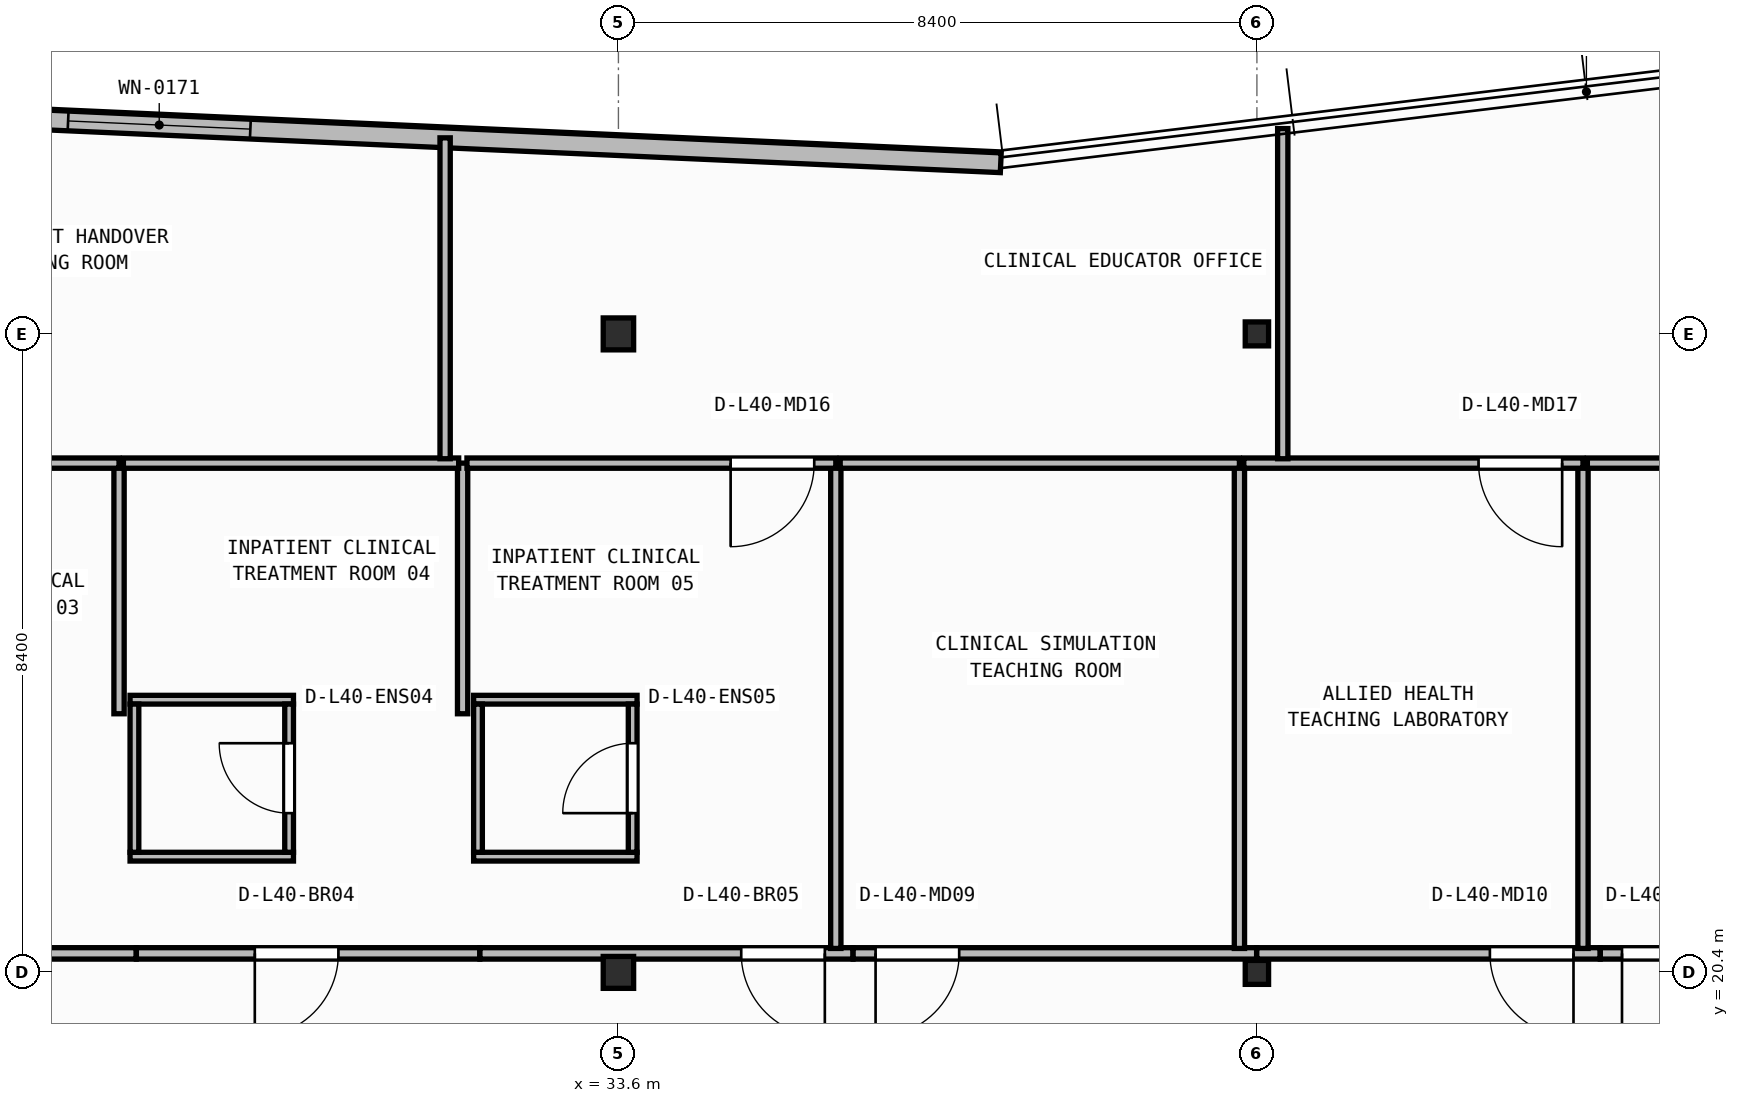
"""IFC4 building model, lengths in metres.
Left out: names, types, materials, properties, quantities, classifications, styles, units other than length and angle.
Written with IfcOpenShell. Run it as: python <this file> out.ifc"""

import sys

from ifc_helpers import new_model, si_unit, direction, frame, frame_2d, origin, origin_2d, place, context, subcontext, project, spatial, rectangle, i_section, extrude, element, fill, save


model = new_model("IFC4")
c1 = context("Model", 3, precision=1e-05, world=origin(), true_north=direction((0.0, 1.0)))
c2 = subcontext(c1, "Body", "Model", "MODEL_VIEW")
j1 = project(units=[si_unit("LENGTHUNIT", "METRE"), si_unit("PLANEANGLEUNIT", "RADIAN")], contexts=[c1])
p1 = place(None, origin())
s1 = spatial("IfcSite", under=j1, at=p1, CompositionType="ELEMENT")
p2 = place(p1, origin())
s2 = spatial("IfcBuilding", under=s1, at=p2, CompositionType="ELEMENT")
p3 = place(p2, frame((0.0, 0.0, 162.6)))
s3 = spatial("IfcBuildingStorey", under=s2, at=p3, CompositionType="ELEMENT", Elevation=162.6)
p4 = place(p3, frame((33.6, 20.4, 0.0), z_axis=(0.0, 0.0, 1.0), x_axis=(1.0, 0.0, 0.0)))
e1 = element("IfcColumn", 1, at=p4, inside=s3, PredefinedType="COLUMN", context=c2, shape_type="SweptSolid", body=[
    extrude(i_section(OverallWidth=0.4, OverallDepth=0.42, WebThickness=0.025, FlangeThickness=0.04, at=origin_2d()), origin(), (0.0, 0.0, 1.0), 3.95),
])
p5 = place(p3, frame((42.0, 20.4, 0.0), z_axis=(0.0, 0.0, 1.0), x_axis=(1.0, 0.0, 0.0)))
e2 = element("IfcColumn", 2, at=p5, inside=s3, PredefinedType="COLUMN", context=c2, shape_type="SweptSolid", body=[
    extrude(i_section(OverallWidth=0.307, OverallDepth=0.315, WebThickness=0.012, FlangeThickness=0.019, FilletRadius=0.017, at=origin_2d()), origin(), (0.0, 0.0, 1.0), 3.95),
])
p6 = place(p3, frame((33.6, 28.8, 0.0), z_axis=(0.0, 0.0, 1.0), x_axis=(1.0, 0.0, 0.0)))
e3 = element("IfcColumn", 3, at=p6, inside=s3, PredefinedType="COLUMN", context=c2, shape_type="SweptSolid", body=[
    extrude(i_section(OverallWidth=0.4, OverallDepth=0.42, WebThickness=0.025, FlangeThickness=0.04, at=origin_2d()), origin(), (0.0, 0.0, 1.0), 3.95),
])
p7 = place(p3, frame((42.0, 28.8, 0.0), z_axis=(0.0, 0.0, 1.0), x_axis=(1.0, 0.0, 0.0)))
e4 = element("IfcColumn", 4, at=p7, inside=s3, PredefinedType="COLUMN", context=c2, shape_type="SweptSolid", body=[
    extrude(i_section(OverallWidth=0.307, OverallDepth=0.315, WebThickness=0.012, FlangeThickness=0.019, FilletRadius=0.017, at=origin_2d()), origin(), (0.0, 0.0, 1.0), 3.95),
])
p8 = place(p3, frame((38.63, 31.052, 0.0), z_axis=(0.0, 0.0, 1.0), x_axis=(-0.998996592956, 0.044786239663, 0.0)))
e5 = element("IfcWall", 5, at=p8, inside=s3, PredefinedType="STANDARD", context=c2, shape_type="SweptSolid", body=[
    extrude(rectangle(XDim=14.827, YDim=0.26, at=frame_2d((7.414, 0.0))), origin(), (0.0, 0.0, 1.0), 3.71),
])
p9 = place(p8, frame((9.882, 0.0, 0.9)))
e6 = element("IfcOpeningElement", 6, at=p9, cuts=e5, PredefinedType="OPENING", context=c2, shape_type="SweptSolid", body=[
    extrude(rectangle(XDim=2.4, YDim=1.65, at=frame_2d((1.2, 0.825))), frame((0.0, 0.14, 0.0), z_axis=(0.0, -1.0, 0.0), x_axis=(1.0, 0.0, 0.0)), (0.0, 0.0, 1.0), 0.28),
])
for number, where, z_axis, x_axis in (
    (7, (27.175, 21.923, 0.0), (0.0, 0.0, 1.0), (1.0, 0.0, 0.0)),
    (8, (27.175, 23.988, 0.0), (0.0, 0.0, 1.0), (1.0, 0.0, 0.0)),
):
    element("IfcWall", number, at=place(p3, frame(where, z_axis=z_axis, x_axis=x_axis)), inside=s3, PredefinedType="PARTITIONING", context=c2, shape_type="SweptSolid", body=[
        extrude(rectangle(XDim=2.15, YDim=0.115, at=frame_2d((1.075, 0.0))), origin(), (0.0, 0.0, 1.0), 3.71),
    ])
p10 = place(p3, frame((27.232, 21.98, 0.0), z_axis=(0.0, 0.0, 1.0), x_axis=(0.0, 1.0, 0.0)))
e9 = element("IfcWall", 9, at=p10, inside=s3, PredefinedType="PARTITIONING", context=c2, shape_type="SweptSolid", body=[
    extrude(rectangle(XDim=1.95, YDim=0.115, at=frame_2d((0.975, 0.0))), origin(), (0.0, 0.0, 1.0), 3.71),
])
p11 = place(p3, frame((29.268, 21.98, 0.0), z_axis=(0.0, 0.0, 1.0), x_axis=(0.0, 1.0, 0.0)))
e10 = element("IfcWall", 10, at=p11, inside=s3, PredefinedType="PARTITIONING", context=c2, shape_type="SweptSolid", body=[
    extrude(rectangle(XDim=1.95, YDim=0.115, at=frame_2d((0.975, 0.0))), origin(), (0.0, 0.0, 1.0), 3.71),
])
p12 = place(p11, frame((0.515, 0.0, 0.0)))
e11 = element("IfcOpeningElement", 11, at=p12, cuts=e10, PredefinedType="OPENING", context=c2, shape_type="SweptSolid", body=[
    extrude(rectangle(XDim=0.92, YDim=2.1, at=frame_2d((0.46, 1.05))), frame((0.0, 0.067, 0.0), z_axis=(0.0, -1.0, 0.0), x_axis=(1.0, 0.0, 0.0)), (0.0, 0.0, 1.0), 0.135),
])
for number, where, z_axis, x_axis in (
    (12, (31.695, 21.923, 0.0), (0.0, 0.0, 1.0), (1.0, 0.0, 0.0)),
    (13, (31.695, 23.988, 0.0), (0.0, 0.0, 1.0), (1.0, 0.0, 0.0)),
):
    element("IfcWall", number, at=place(p3, frame(where, z_axis=z_axis, x_axis=x_axis)), inside=s3, PredefinedType="PARTITIONING", context=c2, shape_type="SweptSolid", body=[
        extrude(rectangle(XDim=2.15, YDim=0.115, at=frame_2d((1.075, 0.0))), origin(), (0.0, 0.0, 1.0), 3.71),
    ])
p13 = place(p3, frame((31.752, 21.98, 0.0), z_axis=(0.0, 0.0, 1.0), x_axis=(0.0, 1.0, 0.0)))
e14 = element("IfcWall", 14, at=p13, inside=s3, PredefinedType="PARTITIONING", context=c2, shape_type="SweptSolid", body=[
    extrude(rectangle(XDim=1.95, YDim=0.115, at=frame_2d((0.975, 0.0))), origin(), (0.0, 0.0, 1.0), 3.71),
])
p14 = place(p3, frame((33.788, 21.98, 0.0), z_axis=(0.0, 0.0, 1.0), x_axis=(0.0, 1.0, 0.0)))
e15 = element("IfcWall", 15, at=p14, inside=s3, PredefinedType="PARTITIONING", context=c2, shape_type="SweptSolid", body=[
    extrude(rectangle(XDim=1.95, YDim=0.115, at=frame_2d((0.975, 0.0))), origin(), (0.0, 0.0, 1.0), 3.152),
])
p15 = place(p14, frame((0.515, 0.0, 0.0)))
e16 = element("IfcOpeningElement", 16, at=p15, cuts=e15, PredefinedType="OPENING", context=c2, shape_type="SweptSolid", body=[
    extrude(rectangle(XDim=0.92, YDim=2.1, at=frame_2d((0.46, 1.05))), frame((0.0, 0.067, 0.0), z_axis=(0.0, -1.0, 0.0), x_axis=(1.0, 0.0, 0.0)), (0.0, 0.0, 1.0), 0.135),
])
p16 = place(p3, frame((27.256, 20.65, 0.0), z_axis=(0.0, 0.0, 1.0), x_axis=(-1.0, 0.0, 0.0)))
e17 = element("IfcWall", 17, at=p16, inside=s3, PredefinedType="PARTITIONING", context=c2, shape_type="SweptSolid", body=[
    extrude(rectangle(XDim=5.536, YDim=0.15, at=frame_2d((2.768, 0.0))), origin(), (0.0, 0.0, 1.0), 3.083),
])
p17 = place(p3, frame((31.776, 20.65, 0.0), z_axis=(0.0, 0.0, 1.0), x_axis=(-1.0, 0.0, 0.0)))
e18 = element("IfcWall", 18, at=p17, inside=s3, PredefinedType="PARTITIONING", context=c2, shape_type="SweptSolid", body=[
    extrude(rectangle(XDim=4.518, YDim=0.15, at=frame_2d((2.259, 0.0))), origin(), (0.0, 0.0, 1.0), 3.083),
])
p18 = place(p17, frame((1.86, 0.0, 0.0)))
e19 = element("IfcOpeningElement", 19, at=p18, cuts=e18, PredefinedType="OPENING", context=c2, shape_type="SweptSolid", body=[
    extrude(rectangle(XDim=1.1, YDim=2.1, at=frame_2d((0.55, 1.05))), frame((0.0, 0.085, 0.0), z_axis=(0.0, -1.0, 0.0), x_axis=(1.0, 0.0, 0.0)), (0.0, 0.0, 1.0), 0.17),
])
p19 = place(p3, frame((36.686, 20.65, 0.0), z_axis=(0.0, 0.0, 1.0), x_axis=(-1.0, 0.0, 0.0)))
e20 = element("IfcWall", 20, at=p19, inside=s3, PredefinedType="PARTITIONING", context=c2, shape_type="SweptSolid", body=[
    extrude(rectangle(XDim=4.908, YDim=0.15, at=frame_2d((2.454, 0.0))), origin(), (0.0, 0.0, 1.0), 3.083),
])
p20 = place(p19, frame((0.37, 0.0, 0.0)))
e21 = element("IfcOpeningElement", 21, at=p20, cuts=e20, PredefinedType="OPENING", context=c2, shape_type="SweptSolid", body=[
    extrude(rectangle(XDim=1.1, YDim=2.1, at=frame_2d((0.55, 1.05))), frame((0.0, 0.085, 0.0), z_axis=(0.0, -1.0, 0.0), x_axis=(1.0, 0.0, 0.0)), (0.0, 0.0, 1.0), 0.17),
])
p21 = place(p3, frame((41.996, 20.65, 0.0), z_axis=(0.0, 0.0, 1.0), x_axis=(-1.0, 0.0, 0.0)))
e22 = element("IfcWall", 22, at=p21, inside=s3, PredefinedType="PARTITIONING", context=c2, shape_type="SweptSolid", body=[
    extrude(rectangle(XDim=5.308, YDim=0.15, at=frame_2d((2.654, 0.0))), origin(), (0.0, 0.0, 1.0), 3.083),
])
p22 = place(p21, frame((3.913, 0.0, 0.0)))
e23 = element("IfcOpeningElement", 23, at=p22, cuts=e22, PredefinedType="OPENING", context=c2, shape_type="SweptSolid", body=[
    extrude(rectangle(XDim=1.1, YDim=2.1, at=frame_2d((0.55, 1.05))), frame((0.0, 0.085, 0.0), z_axis=(0.0, -1.0, 0.0), x_axis=(1.0, 0.0, 0.0)), (0.0, 0.0, 1.0), 0.17),
])
p23 = place(p3, frame((46.516, 20.65, 0.0), z_axis=(0.0, 0.0, 1.0), x_axis=(-1.0, 0.0, 0.0)))
e24 = element("IfcWall", 24, at=p23, inside=s3, PredefinedType="PARTITIONING", context=c2, shape_type="SweptSolid", body=[
    extrude(rectangle(XDim=4.518, YDim=0.15, at=frame_2d((2.259, 0.0))), origin(), (0.0, 0.0, 1.0), 3.083),
])
p24 = place(p23, frame((0.351, 0.0, 0.0)))
e25 = element("IfcOpeningElement", 25, at=p24, cuts=e24, PredefinedType="OPENING", context=c2, shape_type="SweptSolid", body=[
    extrude(rectangle(XDim=1.1, YDim=2.1, at=frame_2d((0.55, 1.05))), frame((0.0, 0.085, 0.0), z_axis=(0.0, -1.0, 0.0), x_axis=(1.0, 0.0, 0.0)), (0.0, 0.0, 1.0), 0.17),
])
p25 = place(p3, frame((51.426, 20.65, 0.0), z_axis=(0.0, 0.0, 1.0), x_axis=(-1.0, 0.0, 0.0)))
e26 = element("IfcWall", 26, at=p25, inside=s3, PredefinedType="PARTITIONING", context=c2, shape_type="SweptSolid", body=[
    extrude(rectangle(XDim=4.908, YDim=0.15, at=frame_2d((2.454, 0.0))), origin(), (0.0, 0.0, 1.0), 3.083),
])
p26 = place(p25, frame((3.523, 0.0, 0.0)))
e27 = element("IfcOpeningElement", 27, at=p26, cuts=e26, PredefinedType="OPENING", context=c2, shape_type="SweptSolid", body=[
    extrude(rectangle(XDim=1.1, YDim=2.1, at=frame_2d((0.55, 1.05))), frame((0.0, 0.085, 0.0), z_axis=(0.0, -1.0, 0.0), x_axis=(1.0, 0.0, 0.0)), (0.0, 0.0, 1.0), 0.17),
])
p27 = place(p3, frame((27.03, 23.802, 0.0), z_axis=(0.0, 0.0, 1.0), x_axis=(0.0, 1.0, 0.0)))
e28 = element("IfcWall", 28, at=p27, inside=s3, PredefinedType="PARTITIONING", context=c2, shape_type="SweptSolid", body=[
    extrude(rectangle(XDim=3.298, YDim=0.135, at=frame_2d((1.649, 0.0))), origin(), (0.0, 0.0, 1.0), 3.71),
])
p28 = place(p3, frame((27.03, 27.1, 0.0), z_axis=(0.0, 0.0, 1.0), x_axis=(-1.0, 0.0, 0.0)))
e29 = element("IfcWall", 29, at=p28, inside=s3, PredefinedType="PARTITIONING", context=c2, shape_type="SweptSolid", body=[
    extrude(rectangle(XDim=5.265, YDim=0.135, at=frame_2d((2.633, 0.0))), origin(), (0.0, 0.0, 1.0), 3.71),
])
p29 = place(p28, frame((3.588, 0.0, 0.0)))
e30 = element("IfcOpeningElement", 30, at=p29, cuts=e29, PredefinedType="OPENING", context=c2, shape_type="SweptSolid", body=[
    extrude(rectangle(XDim=1.1, YDim=2.1, at=frame_2d((0.55, 1.05))), frame((0.0, 0.077, 0.0), z_axis=(0.0, -1.0, 0.0), x_axis=(1.0, 0.0, 0.0)), (0.0, 0.0, 1.0), 0.155),
])
p30 = place(p3, frame((31.55, 23.802, 0.0), z_axis=(0.0, 0.0, 1.0), x_axis=(0.0, 1.0, 0.0)))
e31 = element("IfcWall", 31, at=p30, inside=s3, PredefinedType="PARTITIONING", context=c2, shape_type="SweptSolid", body=[
    extrude(rectangle(XDim=3.298, YDim=0.135, at=frame_2d((1.649, 0.0))), origin(), (0.0, 0.0, 1.0), 3.71),
])
p31 = place(p3, frame((31.499, 27.1, 0.0), z_axis=(0.0, 0.0, 1.0), x_axis=(-1.0, 0.0, 0.0)))
e32 = element("IfcWall", 32, at=p31, inside=s3, PredefinedType="PARTITIONING", context=c2, shape_type="SweptSolid", body=[
    extrude(rectangle(XDim=4.411, YDim=0.135, at=frame_2d((2.206, 0.0))), origin(), (0.0, 0.0, 1.0), 3.71),
])
p32 = place(p3, frame((36.46, 20.715, 0.0), z_axis=(0.0, 0.0, 1.0), x_axis=(0.0, 1.0, 0.0)))
e33 = element("IfcWall", 33, at=p32, inside=s3, PredefinedType="PARTITIONING", context=c2, shape_type="SweptSolid", body=[
    extrude(rectangle(XDim=6.385, YDim=0.135, at=frame_2d((3.192, 0.0))), origin(), (0.0, 0.0, 1.0), 3.71),
])
p33 = place(p3, frame((36.46, 27.1, 0.0), z_axis=(0.0, 0.0, 1.0), x_axis=(-1.0, 0.0, 0.0)))
e34 = element("IfcWall", 34, at=p33, inside=s3, PredefinedType="PARTITIONING", context=c2, shape_type="SweptSolid", body=[
    extrude(rectangle(XDim=4.853, YDim=0.135, at=frame_2d((2.426, 0.0))), origin(), (0.0, 0.0, 1.0), 3.71),
])
p34 = place(p33, frame((0.284, 0.0, 0.0)))
e35 = element("IfcOpeningElement", 35, at=p34, cuts=e34, PredefinedType="OPENING", context=c2, shape_type="SweptSolid", body=[
    extrude(rectangle(XDim=1.1, YDim=2.1, at=frame_2d((0.55, 1.05))), frame((0.0, 0.077, 0.0), z_axis=(0.0, -1.0, 0.0), x_axis=(1.0, 0.0, 0.0)), (0.0, 0.0, 1.0), 0.155),
])
p35 = place(p3, frame((41.77, 20.715, 0.0), z_axis=(0.0, 0.0, 1.0), x_axis=(0.0, 1.0, 0.0)))
e36 = element("IfcWall", 36, at=p35, inside=s3, PredefinedType="PARTITIONING", context=c2, shape_type="SweptSolid", body=[
    extrude(rectangle(XDim=6.385, YDim=0.135, at=frame_2d((3.192, 0.0))), origin(), (0.0, 0.0, 1.0), 3.152),
])
p36 = place(p3, frame((41.77, 27.1, 0.0), z_axis=(0.0, 0.0, 1.0), x_axis=(-1.0, 0.0, 0.0)))
e37 = element("IfcWall", 37, at=p36, inside=s3, PredefinedType="PARTITIONING", context=c2, shape_type="SweptSolid", body=[
    extrude(rectangle(XDim=5.252, YDim=0.135, at=frame_2d((2.626, 0.0))), origin(), (0.0, 0.0, 1.0), 3.71),
])
p37 = place(p3, frame((46.29, 20.715, 0.0), z_axis=(0.0, 0.0, 1.0), x_axis=(0.0, 1.0, 0.0)))
e38 = element("IfcWall", 38, at=p37, inside=s3, PredefinedType="PARTITIONING", context=c2, shape_type="SweptSolid", body=[
    extrude(rectangle(XDim=6.385, YDim=0.135, at=frame_2d((3.192, 0.0))), origin(), (0.0, 0.0, 1.0), 3.71),
])
p38 = place(p3, frame((46.29, 27.1, 0.0), z_axis=(0.0, 0.0, 1.0), x_axis=(-1.0, 0.0, 0.0)))
e39 = element("IfcWall", 39, at=p38, inside=s3, PredefinedType="PARTITIONING", context=c2, shape_type="SweptSolid", body=[
    extrude(rectangle(XDim=4.463, YDim=0.135, at=frame_2d((2.231, 0.0))), origin(), (0.0, 0.0, 1.0), 3.71),
])
p39 = place(p38, frame((0.274, 0.0, 0.0)))
e40 = element("IfcOpeningElement", 40, at=p39, cuts=e39, PredefinedType="OPENING", context=c2, shape_type="SweptSolid", body=[
    extrude(rectangle(XDim=1.1, YDim=2.1, at=frame_2d((0.55, 1.05))), frame((0.0, 0.077, 0.0), z_axis=(0.0, -1.0, 0.0), x_axis=(1.0, 0.0, 0.0)), (0.0, 0.0, 1.0), 0.155),
])
p40 = place(p3, frame((51.2, 27.1, 0.0), z_axis=(0.0, 0.0, 1.0), x_axis=(-1.0, 0.0, 0.0)))
e41 = element("IfcWall", 41, at=p40, inside=s3, PredefinedType="PARTITIONING", context=c2, shape_type="SweptSolid", body=[
    extrude(rectangle(XDim=4.853, YDim=0.135, at=frame_2d((2.426, 0.0))), origin(), (0.0, 0.0, 1.0), 3.71),
])
p41 = place(p3, frame((31.32, 27.157, 0.0), z_axis=(0.0, 0.0, 1.0), x_axis=(0.0, 1.0, 0.0)))
e42 = element("IfcWall", 42, at=p41, inside=s3, PredefinedType="PARTITIONING", context=c2, shape_type="SweptSolid", body=[
    extrude(rectangle(XDim=4.222, YDim=0.135, at=frame_2d((2.111, 0.0))), origin(), (0.0, 0.0, 1.0), 3.71),
])
p42 = place(p3, frame((42.34, 27.157, 0.0), z_axis=(0.0, 0.0, 1.0), x_axis=(0.0, 1.0, 0.0)))
e43 = element("IfcWall", 43, at=p42, inside=s3, PredefinedType="PARTITIONING", context=c2, shape_type="SweptSolid", body=[
    extrude(rectangle(XDim=4.344, YDim=0.135, at=frame_2d((2.172, 0.0))), origin(), (0.0, 0.0, 1.0), 3.152),
])
p43 = place(p9, origin())
e44 = element("IfcWindow", 44, at=p43, inside=s3, PartitioningType="SINGLE_PANEL", PredefinedType="WINDOW", context=c2, shape_type="SweptSolid", body=[
    extrude(rectangle(XDim=2.4, YDim=1.65, at=frame_2d((1.2, 0.825))), frame((0.0, 0.03, 0.0), z_axis=(0.0, -1.0, 0.0), x_axis=(1.0, 0.0, 0.0)), (0.0, 0.0, 1.0), 0.06),
])
fill(e6, e44)
p44 = place(p12, origin())
e45 = element("IfcDoor", 45, at=p44, inside=s3, OperationType="SINGLE_SWING_RIGHT", PredefinedType="DOOR", context=c2, shape_type="SweptSolid", body=[
    extrude(rectangle(XDim=0.92, YDim=2.1, at=frame_2d((0.46, 1.05))), frame((0.0, 0.025, 0.0), z_axis=(0.0, -1.0, 0.0), x_axis=(1.0, 0.0, 0.0)), (0.0, 0.0, 1.0), 0.05),
])
fill(e11, e45)
p45 = place(p15, origin())
e46 = element("IfcDoor", 46, at=p45, inside=s3, OperationType="SINGLE_SWING_LEFT", PredefinedType="DOOR", context=c2, shape_type="SweptSolid", body=[
    extrude(rectangle(XDim=0.92, YDim=2.1, at=frame_2d((0.46, 1.05))), frame((0.0, 0.025, 0.0), z_axis=(0.0, -1.0, 0.0), x_axis=(1.0, 0.0, 0.0)), (0.0, 0.0, 1.0), 0.05),
])
fill(e16, e46)
p46 = place(p18, origin())
e47 = element("IfcDoor", 47, at=p46, inside=s3, OperationType="SINGLE_SWING_RIGHT", PredefinedType="DOOR", context=c2, shape_type="SweptSolid", body=[
    extrude(rectangle(XDim=1.1, YDim=2.1, at=frame_2d((0.55, 1.05))), frame((0.0, 0.025, 0.0), z_axis=(0.0, -1.0, 0.0), x_axis=(1.0, 0.0, 0.0)), (0.0, 0.0, 1.0), 0.05),
])
fill(e19, e47)
p47 = place(p20, origin())
e48 = element("IfcDoor", 48, at=p47, inside=s3, OperationType="SINGLE_SWING_LEFT", PredefinedType="DOOR", context=c2, shape_type="SweptSolid", body=[
    extrude(rectangle(XDim=1.1, YDim=2.1, at=frame_2d((0.55, 1.05))), frame((0.0, 0.025, 0.0), z_axis=(0.0, -1.0, 0.0), x_axis=(1.0, 0.0, 0.0)), (0.0, 0.0, 1.0), 0.05),
])
fill(e21, e48)
p48 = place(p22, origin())
e49 = element("IfcDoor", 49, at=p48, inside=s3, OperationType="SINGLE_SWING_RIGHT", PredefinedType="DOOR", context=c2, shape_type="SweptSolid", body=[
    extrude(rectangle(XDim=1.1, YDim=2.1, at=frame_2d((0.55, 1.05))), frame((0.0, 0.025, 0.0), z_axis=(0.0, -1.0, 0.0), x_axis=(1.0, 0.0, 0.0)), (0.0, 0.0, 1.0), 0.05),
])
fill(e23, e49)
p49 = place(p24, origin())
e50 = element("IfcDoor", 50, at=p49, inside=s3, OperationType="SINGLE_SWING_LEFT", PredefinedType="DOOR", context=c2, shape_type="SweptSolid", body=[
    extrude(rectangle(XDim=1.1, YDim=2.1, at=frame_2d((0.55, 1.05))), frame((0.0, 0.025, 0.0), z_axis=(0.0, -1.0, 0.0), x_axis=(1.0, 0.0, 0.0)), (0.0, 0.0, 1.0), 0.05),
])
fill(e25, e50)
p50 = place(p26, origin())
e51 = element("IfcDoor", 51, at=p50, inside=s3, OperationType="SINGLE_SWING_RIGHT", PredefinedType="DOOR", context=c2, shape_type="SweptSolid", body=[
    extrude(rectangle(XDim=1.1, YDim=2.1, at=frame_2d((0.55, 1.05))), frame((0.0, 0.025, 0.0), z_axis=(0.0, -1.0, 0.0), x_axis=(1.0, 0.0, 0.0)), (0.0, 0.0, 1.0), 0.05),
])
fill(e27, e51)
p51 = place(p34, origin())
e52 = element("IfcDoor", 52, at=p51, inside=s3, OperationType="SINGLE_SWING_RIGHT", PredefinedType="DOOR", context=c2, shape_type="SweptSolid", body=[
    extrude(rectangle(XDim=1.1, YDim=2.1, at=frame_2d((0.55, 1.05))), frame((0.0, 0.025, 0.0), z_axis=(0.0, -1.0, 0.0), x_axis=(1.0, 0.0, 0.0)), (0.0, 0.0, 1.0), 0.05),
])
fill(e35, e52)
p52 = place(p39, origin())
e53 = element("IfcDoor", 53, at=p52, inside=s3, OperationType="SINGLE_SWING_LEFT", PredefinedType="DOOR", context=c2, shape_type="SweptSolid", body=[
    extrude(rectangle(XDim=1.1, YDim=2.1, at=frame_2d((0.55, 1.05))), frame((0.0, 0.025, 0.0), z_axis=(0.0, -1.0, 0.0), x_axis=(1.0, 0.0, 0.0)), (0.0, 0.0, 1.0), 0.05),
])
fill(e40, e53)
save(model, sys.argv[1])
